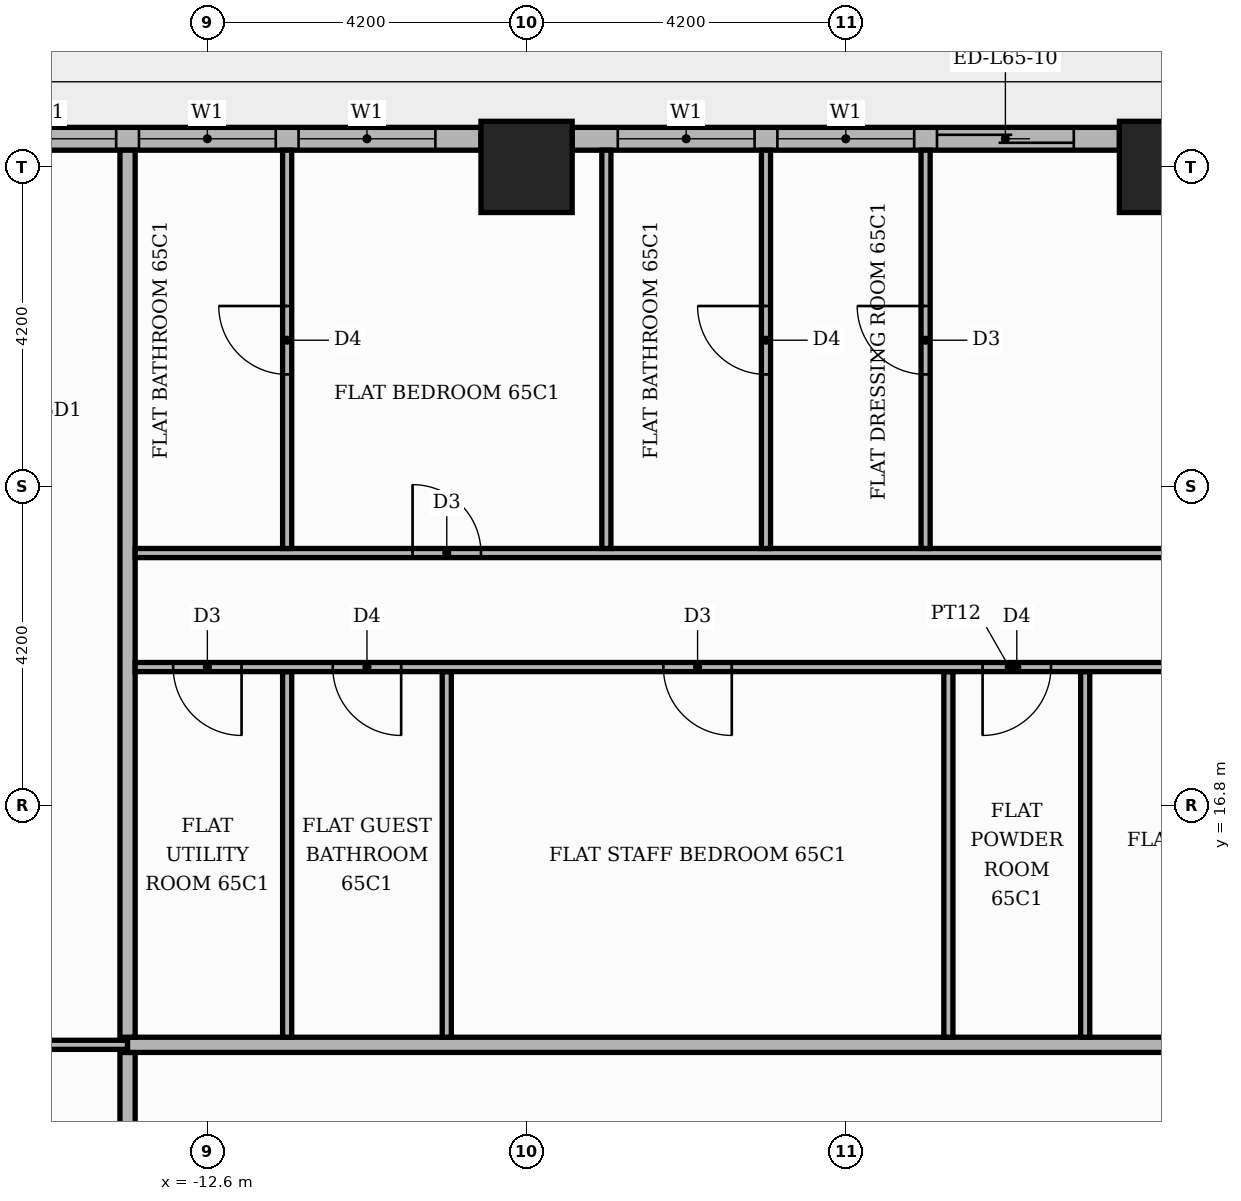
"""IFC4 building model, lengths in metres.
Left out: names, types, materials, properties, quantities, classifications, styles, units other than length and angle.
Written with IfcOpenShell. Run it as: python <this file> out.ifc"""

import sys

from ifc_helpers import new_model, si_unit, direction, frame, frame_2d, origin, origin_2d, place, context, subcontext, project, spatial, rectangle, extrude, element, fill, save


model = new_model("IFC4")
c1 = context("Model", 3, precision=1e-05, world=origin(), true_north=direction((0.0, 1.0)))
c2 = subcontext(c1, "Body", "Model", "MODEL_VIEW")
j1 = project(units=[si_unit("LENGTHUNIT", "METRE"), si_unit("PLANEANGLEUNIT", "RADIAN")], contexts=[c1])
p1 = place(None, origin())
s1 = spatial("IfcSite", under=j1, at=p1, CompositionType="ELEMENT")
p2 = place(p1, origin())
s2 = spatial("IfcBuilding", under=s1, at=p2, CompositionType="ELEMENT")
p3 = place(p2, frame((0.0, 0.0, 271.8)))
s3 = spatial("IfcBuildingStorey", under=s2, at=p3, CompositionType="ELEMENT", Elevation=271.8)
for number, where, z_axis, x_axis in (
    (1, (0.0, 25.2, 0.0), (0.0, 0.0, 1.0), (1.0, 0.0, 0.0)),
    (2, (-8.4, 25.2, 0.0), (0.0, 0.0, 1.0), (1.0, 0.0, 0.0)),
):
    element("IfcColumn", number, at=place(p3, frame(where, z_axis=z_axis, x_axis=x_axis)), inside=s3, PredefinedType="COLUMN", context=c2, shape_type="SweptSolid", body=[
        extrude(rectangle(XDim=1.2, YDim=1.2, at=origin_2d()), origin(), (0.0, 0.0, 1.0), 3.9),
    ])
p4 = place(p3, frame((-0.6, 25.57, 0.0), z_axis=(0.0, 0.0, 1.0), x_axis=(-1.0, 0.0, 0.0)))
e3 = element("IfcWall", 3, at=p4, inside=s3, PredefinedType="STANDARD", context=c2, shape_type="SweptSolid", body=[
    extrude(rectangle(XDim=7.2, YDim=0.3, at=frame_2d((3.6, 0.0))), origin(), (0.0, 0.0, 1.0), 3.48),
])
p5 = place(p4, frame((0.6, 0.0, 0.0)))
e4 = element("IfcOpeningElement", 4, at=p5, cuts=e3, PredefinedType="OPENING", context=c2, shape_type="SweptSolid", body=[
    extrude(rectangle(XDim=1.8, YDim=2.4, at=frame_2d((0.9, 1.2))), frame((0.0, 0.16, 0.0), z_axis=(0.0, -1.0, 0.0), x_axis=(1.0, 0.0, 0.0)), (0.0, 0.0, 1.0), 0.32),
])
p6 = place(p4, frame((2.7, 0.0, 0.9)))
e5 = element("IfcOpeningElement", 5, at=p6, cuts=e3, PredefinedType="OPENING", context=c2, shape_type="SweptSolid", body=[
    extrude(rectangle(XDim=1.8, YDim=2.1, at=frame_2d((0.9, 1.05))), frame((0.0, 0.16, 0.0), z_axis=(0.0, -1.0, 0.0), x_axis=(1.0, 0.0, 0.0)), (0.0, 0.0, 1.0), 0.32),
])
p7 = place(p4, frame((4.8, 0.0, 0.9)))
e6 = element("IfcOpeningElement", 6, at=p7, cuts=e3, PredefinedType="OPENING", context=c2, shape_type="SweptSolid", body=[
    extrude(rectangle(XDim=1.8, YDim=2.1, at=frame_2d((0.9, 1.05))), frame((0.0, 0.16, 0.0), z_axis=(0.0, -1.0, 0.0), x_axis=(1.0, 0.0, 0.0)), (0.0, 0.0, 1.0), 0.32),
])
p8 = place(p3, frame((-9.0, 25.57, 0.0), z_axis=(0.0, 0.0, 1.0), x_axis=(-1.0, 0.0, 0.0)))
e7 = element("IfcWall", 7, at=p8, inside=s3, PredefinedType="STANDARD", context=c2, shape_type="SweptSolid", body=[
    extrude(rectangle(XDim=7.2, YDim=0.3, at=frame_2d((3.6, 0.0))), origin(), (0.0, 0.0, 1.0), 3.48),
])
p9 = place(p8, frame((0.6, 0.0, 0.9)))
e8 = element("IfcOpeningElement", 8, at=p9, cuts=e7, PredefinedType="OPENING", context=c2, shape_type="SweptSolid", body=[
    extrude(rectangle(XDim=1.8, YDim=2.1, at=frame_2d((0.9, 1.05))), frame((0.0, 0.16, 0.0), z_axis=(0.0, -1.0, 0.0), x_axis=(1.0, 0.0, 0.0)), (0.0, 0.0, 1.0), 0.32),
])
p10 = place(p8, frame((2.7, 0.0, 0.9)))
e9 = element("IfcOpeningElement", 9, at=p10, cuts=e7, PredefinedType="OPENING", context=c2, shape_type="SweptSolid", body=[
    extrude(rectangle(XDim=1.8, YDim=2.1, at=frame_2d((0.9, 1.05))), frame((0.0, 0.16, 0.0), z_axis=(0.0, -1.0, 0.0), x_axis=(1.0, 0.0, 0.0)), (0.0, 0.0, 1.0), 0.32),
])
p11 = place(p8, frame((4.8, 0.0, 0.9)))
e10 = element("IfcOpeningElement", 10, at=p11, cuts=e7, PredefinedType="OPENING", context=c2, shape_type="SweptSolid", body=[
    extrude(rectangle(XDim=1.8, YDim=2.1, at=frame_2d((0.9, 1.05))), frame((0.0, 0.16, 0.0), z_axis=(0.0, -1.0, 0.0), x_axis=(1.0, 0.0, 0.0)), (0.0, 0.0, 1.0), 0.32),
])
p12 = place(p3, frame((-13.65, 11.1, 0.0), z_axis=(0.0, 0.0, 1.0), x_axis=(0.0, 1.0, 0.0)))
e11 = element("IfcWall", 11, at=p12, inside=s3, PredefinedType="PARTITIONING", context=c2, shape_type="SweptSolid", body=[
    extrude(rectangle(XDim=2.45, YDim=0.2, at=frame_2d((1.225, 0.0))), origin(), (0.0, 0.0, 1.0), 3.48),
])
p13 = place(p3, frame((-20.42, 13.65, 0.0), z_axis=(0.0, 0.0, 1.0), x_axis=(1.0, 0.0, 0.0)))
e12 = element("IfcWall", 12, at=p13, inside=s3, PredefinedType="PARTITIONING", context=c2, shape_type="SweptSolid", body=[
    extrude(rectangle(XDim=6.77, YDim=0.12, at=frame_2d((3.385, 0.0))), origin(), (0.0, 0.0, 1.0), 3.48),
])
p14 = place(p13, frame((2.885, 0.0, 0.0)))
e13 = element("IfcOpeningElement", 13, at=p14, cuts=e12, PredefinedType="OPENING", context=c2, shape_type="SweptSolid", body=[
    extrude(rectangle(XDim=1.0, YDim=2.1, at=frame_2d((0.5, 1.05))), frame((0.0, 0.07, 0.0), z_axis=(0.0, -1.0, 0.0), x_axis=(1.0, 0.0, 0.0)), (0.0, 0.0, 1.0), 0.14),
])
p15 = place(p3, frame((-13.65, 13.65, 0.0), z_axis=(0.0, 0.0, 1.0), x_axis=(1.0, 0.0, 0.0)))
e14 = element("IfcWall", 14, at=p15, inside=s3, PredefinedType="PARTITIONING", context=c2, shape_type="SweptSolid", body=[
    extrude(rectangle(XDim=39.07, YDim=0.2, at=frame_2d((19.535, 0.0))), origin(), (0.0, 0.0, 1.0), 3.48),
])
p16 = place(p15, frame((24.65, 0.0, 0.0)))
e15 = element("IfcOpeningElement", 15, at=p16, cuts=e14, PredefinedType="OPENING", context=c2, shape_type="SweptSolid", body=[
    extrude(rectangle(XDim=1.1, YDim=2.4, at=frame_2d((0.55, 1.2))), frame((0.0, 0.11, 0.0), z_axis=(0.0, -1.0, 0.0), x_axis=(1.0, 0.0, 0.0)), (0.0, 0.0, 1.0), 0.22),
])
p17 = place(p3, frame((-13.65, 13.75, 0.0), z_axis=(0.0, 0.0, 1.0), x_axis=(0.0, 1.0, 0.0)))
e16 = element("IfcWall", 16, at=p17, inside=s3, PredefinedType="PARTITIONING", context=c2, shape_type="SweptSolid", body=[
    extrude(rectangle(XDim=11.67, YDim=0.2, at=frame_2d((5.835, 0.0))), origin(), (0.0, 0.0, 1.0), 3.48),
])
for number, where, z_axis, x_axis in (
    (17, (-11.55, 13.75, 0.0), (0.0, 0.0, 1.0), (0.0, 1.0, 0.0)),
    (18, (-9.45, 13.75, 0.0), (0.0, 0.0, 1.0), (0.0, 1.0, 0.0)),
    (19, (-2.85, 13.75, 0.0), (0.0, 0.0, 1.0), (0.0, 1.0, 0.0)),
    (20, (-1.05, 13.75, 0.0), (0.0, 0.0, 1.0), (0.0, 1.0, 0.0)),
):
    element("IfcWall", number, at=place(p3, frame(where, z_axis=z_axis, x_axis=x_axis)), inside=s3, PredefinedType="PARTITIONING", context=c2, shape_type="SweptSolid", body=[
        extrude(rectangle(XDim=4.81, YDim=0.12, at=frame_2d((2.405, 0.0))), origin(), (0.0, 0.0, 1.0), 3.48),
    ])
p18 = place(p3, frame((-13.55, 18.62, 0.0), z_axis=(0.0, 0.0, 1.0), x_axis=(1.0, 0.0, 0.0)))
e21 = element("IfcWall", 21, at=p18, inside=s3, PredefinedType="PARTITIONING", context=c2, shape_type="SweptSolid", body=[
    extrude(rectangle(XDim=23.0, YDim=0.12, at=frame_2d((11.5, 0.0))), origin(), (0.0, 0.0, 1.0), 3.48),
])
p19 = place(p18, frame((19.25, 0.0, 0.0)))
e22 = element("IfcOpeningElement", 22, at=p19, cuts=e21, PredefinedType="OPENING", context=c2, shape_type="SweptSolid", body=[
    extrude(rectangle(XDim=0.9, YDim=2.1, at=frame_2d((0.45, 1.05))), frame((0.0, 0.07, 0.0), z_axis=(0.0, -1.0, 0.0), x_axis=(1.0, 0.0, 0.0)), (0.0, 0.0, 1.0), 0.14),
])
p20 = place(p18, frame((14.0, 0.0, 0.0)))
e23 = element("IfcOpeningElement", 23, at=p20, cuts=e21, PredefinedType="OPENING", context=c2, shape_type="SweptSolid", body=[
    extrude(rectangle(XDim=0.9, YDim=2.1, at=frame_2d((0.45, 1.05))), frame((0.0, 0.07, 0.0), z_axis=(0.0, -1.0, 0.0), x_axis=(1.0, 0.0, 0.0)), (0.0, 0.0, 1.0), 0.14),
])
p21 = place(p18, frame((11.15, 0.0, 0.0)))
e24 = element("IfcOpeningElement", 24, at=p21, cuts=e21, PredefinedType="OPENING", context=c2, shape_type="SweptSolid", body=[
    extrude(rectangle(XDim=0.9, YDim=2.1, at=frame_2d((0.45, 1.05))), frame((0.0, 0.07, 0.0), z_axis=(0.0, -1.0, 0.0), x_axis=(1.0, 0.0, 0.0)), (0.0, 0.0, 1.0), 0.14),
])
p22 = place(p18, frame((6.95, 0.0, 0.0)))
e25 = element("IfcOpeningElement", 25, at=p22, cuts=e21, PredefinedType="OPENING", context=c2, shape_type="SweptSolid", body=[
    extrude(rectangle(XDim=0.9, YDim=2.1, at=frame_2d((0.45, 1.05))), frame((0.0, 0.07, 0.0), z_axis=(0.0, -1.0, 0.0), x_axis=(1.0, 0.0, 0.0)), (0.0, 0.0, 1.0), 0.14),
])
p23 = place(p18, frame((2.6, 0.0, 0.0)))
e26 = element("IfcOpeningElement", 26, at=p23, cuts=e21, PredefinedType="OPENING", context=c2, shape_type="SweptSolid", body=[
    extrude(rectangle(XDim=0.9, YDim=2.1, at=frame_2d((0.45, 1.05))), frame((0.0, 0.07, 0.0), z_axis=(0.0, -1.0, 0.0), x_axis=(1.0, 0.0, 0.0)), (0.0, 0.0, 1.0), 0.14),
])
p24 = place(p18, frame((0.5, 0.0, 0.0)))
e27 = element("IfcOpeningElement", 27, at=p24, cuts=e21, PredefinedType="OPENING", context=c2, shape_type="SweptSolid", body=[
    extrude(rectangle(XDim=0.9, YDim=2.1, at=frame_2d((0.45, 1.05))), frame((0.0, 0.07, 0.0), z_axis=(0.0, -1.0, 0.0), x_axis=(1.0, 0.0, 0.0)), (0.0, 0.0, 1.0), 0.14),
])
p25 = place(p3, frame((-13.55, 20.12, 0.0), z_axis=(0.0, 0.0, 1.0), x_axis=(1.0, 0.0, 0.0)))
e28 = element("IfcWall", 28, at=p25, inside=s3, PredefinedType="PARTITIONING", context=c2, shape_type="SweptSolid", body=[
    extrude(rectangle(XDim=34.269, YDim=0.12, at=frame_2d((17.135, 0.0))), origin(), (0.0, 0.0, 1.0), 3.48),
])
p26 = place(p25, frame((27.75, 0.0, 0.0)))
e29 = element("IfcOpeningElement", 29, at=p26, cuts=e28, PredefinedType="OPENING", context=c2, shape_type="SweptSolid", body=[
    extrude(rectangle(XDim=1.0, YDim=2.1, at=frame_2d((0.5, 1.05))), frame((0.0, 0.07, 0.0), z_axis=(0.0, -1.0, 0.0), x_axis=(1.0, 0.0, 0.0)), (0.0, 0.0, 1.0), 0.14),
])
p27 = place(p25, frame((22.5, 0.0, 0.0)))
e30 = element("IfcOpeningElement", 30, at=p27, cuts=e28, PredefinedType="OPENING", context=c2, shape_type="SweptSolid", body=[
    extrude(rectangle(XDim=1.0, YDim=2.1, at=frame_2d((0.5, 1.05))), frame((0.0, 0.07, 0.0), z_axis=(0.0, -1.0, 0.0), x_axis=(1.0, 0.0, 0.0)), (0.0, 0.0, 1.0), 0.14),
])
p28 = place(p25, frame((14.15, 0.0, 0.0)))
e31 = element("IfcOpeningElement", 31, at=p28, cuts=e28, PredefinedType="OPENING", context=c2, shape_type="SweptSolid", body=[
    extrude(rectangle(XDim=0.9, YDim=2.1, at=frame_2d((0.45, 1.05))), frame((0.0, 0.07, 0.0), z_axis=(0.0, -1.0, 0.0), x_axis=(1.0, 0.0, 0.0)), (0.0, 0.0, 1.0), 0.14),
])
p29 = place(p25, frame((3.65, 0.0, 0.0)))
e32 = element("IfcOpeningElement", 32, at=p29, cuts=e28, PredefinedType="OPENING", context=c2, shape_type="SweptSolid", body=[
    extrude(rectangle(XDim=0.9, YDim=2.1, at=frame_2d((0.45, 1.05))), frame((0.0, 0.07, 0.0), z_axis=(0.0, -1.0, 0.0), x_axis=(1.0, 0.0, 0.0)), (0.0, 0.0, 1.0), 0.14),
])
p30 = place(p3, frame((-11.55, 20.18, 0.0), z_axis=(0.0, 0.0, 1.0), x_axis=(0.0, 1.0, 0.0)))
e33 = element("IfcWall", 33, at=p30, inside=s3, PredefinedType="PARTITIONING", context=c2, shape_type="SweptSolid", body=[
    extrude(rectangle(XDim=5.24, YDim=0.12, at=frame_2d((2.62, 0.0))), origin(), (0.0, 0.0, 1.0), 3.48),
])
p31 = place(p30, frame((2.29, 0.0, 0.0)))
e34 = element("IfcOpeningElement", 34, at=p31, cuts=e33, PredefinedType="OPENING", context=c2, shape_type="SweptSolid", body=[
    extrude(rectangle(XDim=0.9, YDim=2.1, at=frame_2d((0.45, 1.05))), frame((0.0, 0.07, 0.0), z_axis=(0.0, -1.0, 0.0), x_axis=(1.0, 0.0, 0.0)), (0.0, 0.0, 1.0), 0.14),
])
p32 = place(p3, frame((-7.35, 20.18, 0.0), z_axis=(0.0, 0.0, 1.0), x_axis=(0.0, 1.0, 0.0)))
e35 = element("IfcWall", 35, at=p32, inside=s3, PredefinedType="PARTITIONING", context=c2, shape_type="SweptSolid", body=[
    extrude(rectangle(XDim=5.24, YDim=0.12, at=frame_2d((2.62, 0.0))), origin(), (0.0, 0.0, 1.0), 3.48),
])
p33 = place(p3, frame((-5.25, 20.18, 0.0), z_axis=(0.0, 0.0, 1.0), x_axis=(0.0, 1.0, 0.0)))
e36 = element("IfcWall", 36, at=p33, inside=s3, PredefinedType="PARTITIONING", context=c2, shape_type="SweptSolid", body=[
    extrude(rectangle(XDim=5.24, YDim=0.12, at=frame_2d((2.62, 0.0))), origin(), (0.0, 0.0, 1.0), 3.48),
])
p34 = place(p33, frame((2.29, 0.0, 0.0)))
e37 = element("IfcOpeningElement", 37, at=p34, cuts=e36, PredefinedType="OPENING", context=c2, shape_type="SweptSolid", body=[
    extrude(rectangle(XDim=0.9, YDim=2.1, at=frame_2d((0.45, 1.05))), frame((0.0, 0.07, 0.0), z_axis=(0.0, -1.0, 0.0), x_axis=(1.0, 0.0, 0.0)), (0.0, 0.0, 1.0), 0.14),
])
p35 = place(p3, frame((-3.15, 20.18, 0.0), z_axis=(0.0, 0.0, 1.0), x_axis=(0.0, 1.0, 0.0)))
e38 = element("IfcWall", 38, at=p35, inside=s3, PredefinedType="PARTITIONING", context=c2, shape_type="SweptSolid", body=[
    extrude(rectangle(XDim=5.24, YDim=0.12, at=frame_2d((2.62, 0.0))), origin(), (0.0, 0.0, 1.0), 3.48),
])
p36 = place(p35, frame((2.29, 0.0, 0.0)))
e39 = element("IfcOpeningElement", 39, at=p36, cuts=e38, PredefinedType="OPENING", context=c2, shape_type="SweptSolid", body=[
    extrude(rectangle(XDim=0.9, YDim=2.1, at=frame_2d((0.45, 1.05))), frame((0.0, 0.07, 0.0), z_axis=(0.0, -1.0, 0.0), x_axis=(1.0, 0.0, 0.0)), (0.0, 0.0, 1.0), 0.14),
])
p37 = place(p5, origin())
e40 = element("IfcDoor", 40, at=p37, inside=s3, OperationType="SLIDING_TO_LEFT", PredefinedType="DOOR", context=c2, shape_type="SweptSolid", body=[
    extrude(rectangle(XDim=1.8, YDim=2.4, at=frame_2d((0.9, 1.2))), frame((0.0, 0.025, 0.0), z_axis=(0.0, -1.0, 0.0), x_axis=(1.0, 0.0, 0.0)), (0.0, 0.0, 1.0), 0.05),
])
fill(e4, e40)
p38 = place(p6, origin())
e41 = element("IfcWindow", 41, at=p38, inside=s3, PartitioningType="SINGLE_PANEL", PredefinedType="WINDOW", context=c2, shape_type="SweptSolid", body=[
    extrude(rectangle(XDim=1.8, YDim=2.1, at=frame_2d((0.9, 1.05))), frame((0.0, 0.03, 0.0), z_axis=(0.0, -1.0, 0.0), x_axis=(1.0, 0.0, 0.0)), (0.0, 0.0, 1.0), 0.06),
])
fill(e5, e41)
p39 = place(p7, origin())
e42 = element("IfcWindow", 42, at=p39, inside=s3, PartitioningType="SINGLE_PANEL", PredefinedType="WINDOW", context=c2, shape_type="SweptSolid", body=[
    extrude(rectangle(XDim=1.8, YDim=2.1, at=frame_2d((0.9, 1.05))), frame((0.0, 0.03, 0.0), z_axis=(0.0, -1.0, 0.0), x_axis=(1.0, 0.0, 0.0)), (0.0, 0.0, 1.0), 0.06),
])
fill(e6, e42)
p40 = place(p9, origin())
e43 = element("IfcWindow", 43, at=p40, inside=s3, PartitioningType="SINGLE_PANEL", PredefinedType="WINDOW", context=c2, shape_type="SweptSolid", body=[
    extrude(rectangle(XDim=1.8, YDim=2.1, at=frame_2d((0.9, 1.05))), frame((0.0, 0.03, 0.0), z_axis=(0.0, -1.0, 0.0), x_axis=(1.0, 0.0, 0.0)), (0.0, 0.0, 1.0), 0.06),
])
fill(e8, e43)
p41 = place(p10, origin())
e44 = element("IfcWindow", 44, at=p41, inside=s3, PartitioningType="SINGLE_PANEL", PredefinedType="WINDOW", context=c2, shape_type="SweptSolid", body=[
    extrude(rectangle(XDim=1.8, YDim=2.1, at=frame_2d((0.9, 1.05))), frame((0.0, 0.03, 0.0), z_axis=(0.0, -1.0, 0.0), x_axis=(1.0, 0.0, 0.0)), (0.0, 0.0, 1.0), 0.06),
])
fill(e9, e44)
p42 = place(p11, origin())
e45 = element("IfcWindow", 45, at=p42, inside=s3, PartitioningType="SINGLE_PANEL", PredefinedType="WINDOW", context=c2, shape_type="SweptSolid", body=[
    extrude(rectangle(XDim=1.8, YDim=2.1, at=frame_2d((0.9, 1.05))), frame((0.0, 0.03, 0.0), z_axis=(0.0, -1.0, 0.0), x_axis=(1.0, 0.0, 0.0)), (0.0, 0.0, 1.0), 0.06),
])
fill(e10, e45)
p43 = place(p21, frame((0.9, 0.0, 0.0), z_axis=(0.0, 0.0, 1.0), x_axis=(-1.0, 0.0, 0.0)))
e46 = element("IfcDoor", 46, at=p43, inside=s3, OperationType="SINGLE_SWING_LEFT", PredefinedType="DOOR", context=c2, shape_type="SweptSolid", body=[
    extrude(rectangle(XDim=0.9, YDim=2.1, at=frame_2d((0.45, 1.05))), frame((0.0, 0.025, 0.0), z_axis=(0.0, -1.0, 0.0), x_axis=(1.0, 0.0, 0.0)), (0.0, 0.0, 1.0), 0.05),
])
fill(e24, e46)
p44 = place(p22, frame((0.9, 0.0, 0.0), z_axis=(0.0, 0.0, 1.0), x_axis=(-1.0, 0.0, 0.0)))
e47 = element("IfcDoor", 47, at=p44, inside=s3, OperationType="SINGLE_SWING_RIGHT", PredefinedType="DOOR", context=c2, shape_type="SweptSolid", body=[
    extrude(rectangle(XDim=0.9, YDim=2.1, at=frame_2d((0.45, 1.05))), frame((0.0, 0.025, 0.0), z_axis=(0.0, -1.0, 0.0), x_axis=(1.0, 0.0, 0.0)), (0.0, 0.0, 1.0), 0.05),
])
fill(e25, e47)
p45 = place(p23, frame((0.9, 0.0, 0.0), z_axis=(0.0, 0.0, 1.0), x_axis=(-1.0, 0.0, 0.0)))
e48 = element("IfcDoor", 48, at=p45, inside=s3, OperationType="SINGLE_SWING_RIGHT", PredefinedType="DOOR", context=c2, shape_type="SweptSolid", body=[
    extrude(rectangle(XDim=0.9, YDim=2.1, at=frame_2d((0.45, 1.05))), frame((0.0, 0.025, 0.0), z_axis=(0.0, -1.0, 0.0), x_axis=(1.0, 0.0, 0.0)), (0.0, 0.0, 1.0), 0.05),
])
fill(e26, e48)
p46 = place(p24, frame((0.9, 0.0, 0.0), z_axis=(0.0, 0.0, 1.0), x_axis=(-1.0, 0.0, 0.0)))
e49 = element("IfcDoor", 49, at=p46, inside=s3, OperationType="SINGLE_SWING_RIGHT", PredefinedType="DOOR", context=c2, shape_type="SweptSolid", body=[
    extrude(rectangle(XDim=0.9, YDim=2.1, at=frame_2d((0.45, 1.05))), frame((0.0, 0.025, 0.0), z_axis=(0.0, -1.0, 0.0), x_axis=(1.0, 0.0, 0.0)), (0.0, 0.0, 1.0), 0.05),
])
fill(e27, e49)
p47 = place(p36, origin())
e50 = element("IfcDoor", 50, at=p47, inside=s3, OperationType="SINGLE_SWING_RIGHT", PredefinedType="DOOR", context=c2, shape_type="SweptSolid", body=[
    extrude(rectangle(XDim=0.9, YDim=2.1, at=frame_2d((0.45, 1.05))), frame((0.0, 0.025, 0.0), z_axis=(0.0, -1.0, 0.0), x_axis=(1.0, 0.0, 0.0)), (0.0, 0.0, 1.0), 0.05),
])
fill(e39, e50)
p48 = place(p34, origin())
e51 = element("IfcDoor", 51, at=p48, inside=s3, OperationType="SINGLE_SWING_RIGHT", PredefinedType="DOOR", context=c2, shape_type="SweptSolid", body=[
    extrude(rectangle(XDim=0.9, YDim=2.1, at=frame_2d((0.45, 1.05))), frame((0.0, 0.025, 0.0), z_axis=(0.0, -1.0, 0.0), x_axis=(1.0, 0.0, 0.0)), (0.0, 0.0, 1.0), 0.05),
])
fill(e37, e51)
p49 = place(p29, origin())
e52 = element("IfcDoor", 52, at=p49, inside=s3, OperationType="SINGLE_SWING_LEFT", PredefinedType="DOOR", context=c2, shape_type="SweptSolid", body=[
    extrude(rectangle(XDim=0.9, YDim=2.1, at=frame_2d((0.45, 1.05))), frame((0.0, 0.025, 0.0), z_axis=(0.0, -1.0, 0.0), x_axis=(1.0, 0.0, 0.0)), (0.0, 0.0, 1.0), 0.05),
])
fill(e32, e52)
p50 = place(p31, origin())
e53 = element("IfcDoor", 53, at=p50, inside=s3, OperationType="SINGLE_SWING_RIGHT", PredefinedType="DOOR", context=c2, shape_type="SweptSolid", body=[
    extrude(rectangle(XDim=0.9, YDim=2.1, at=frame_2d((0.45, 1.05))), frame((0.0, 0.025, 0.0), z_axis=(0.0, -1.0, 0.0), x_axis=(1.0, 0.0, 0.0)), (0.0, 0.0, 1.0), 0.05),
])
fill(e34, e53)
save(model, sys.argv[1])
